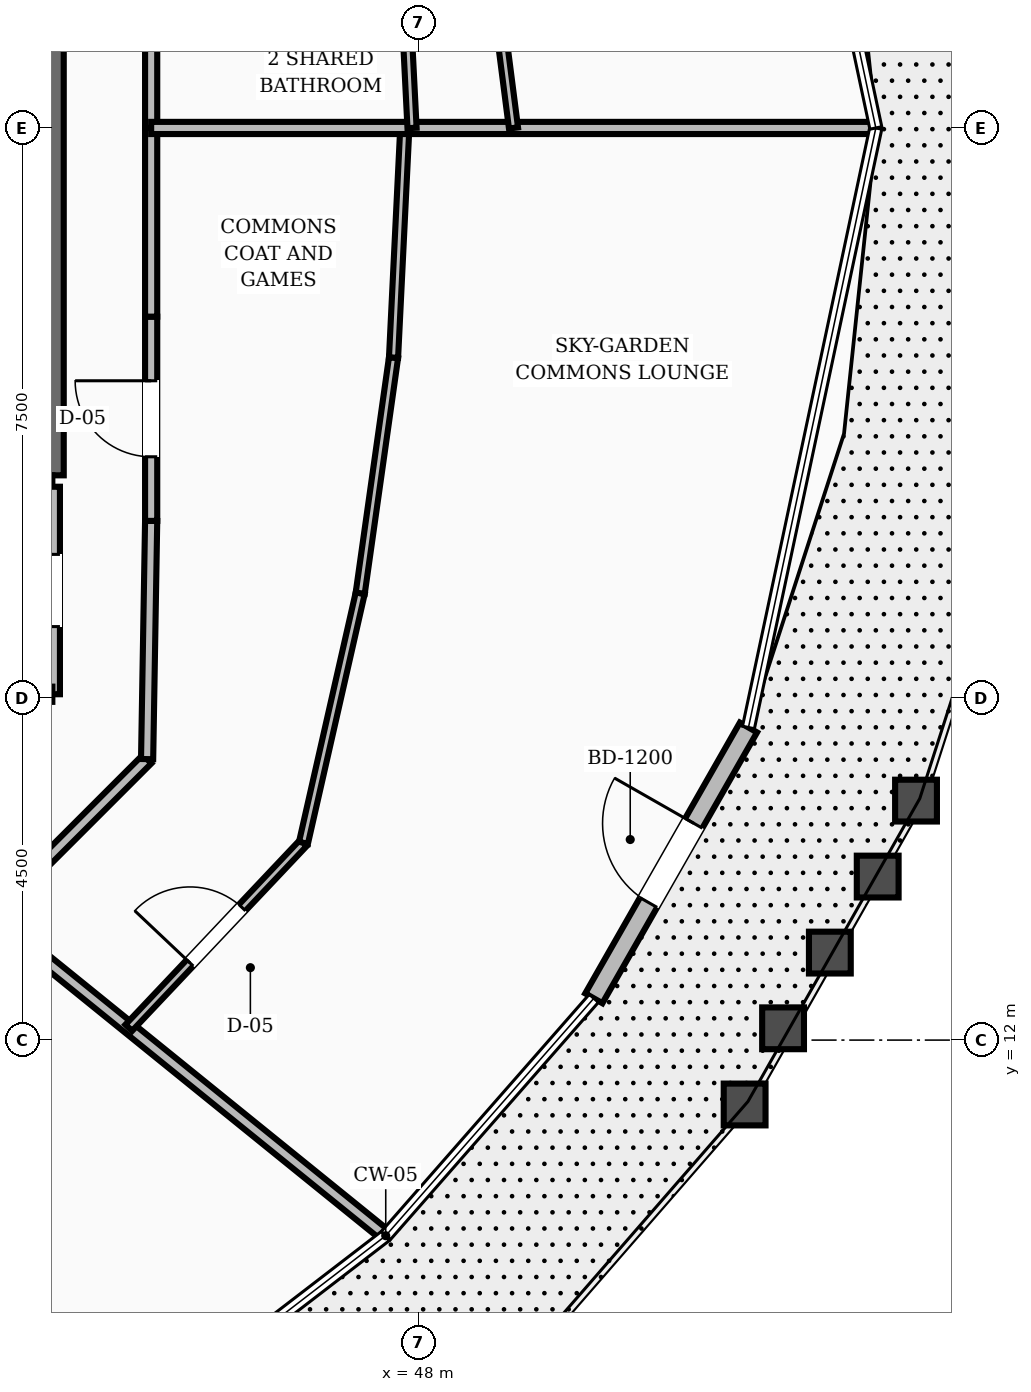
"""IFC4 building model, lengths in metres.
Left out: names, types, materials, properties, quantities, classifications, styles, units other than length and angle.
Written with IfcOpenShell. Run it as: python <this file> out.ifc"""

import sys

from ifc_helpers import new_model, si_unit, direction, frame, frame_2d, origin, place, context, subcontext, project, spatial, rectangle, extrude, element, fill, save


model = new_model("IFC4")
c1 = context("Model", 3, precision=1e-05, world=origin(), true_north=direction((0.0, 1.0)))
c2 = subcontext(c1, "Body", "Model", "MODEL_VIEW")
j1 = project(units=[si_unit("LENGTHUNIT", "METRE"), si_unit("PLANEANGLEUNIT", "RADIAN")], contexts=[c1])
p1 = place(None, origin())
s1 = spatial("IfcSite", under=j1, at=p1, CompositionType="ELEMENT")
p2 = place(p1, origin())
s2 = spatial("IfcBuilding", under=s1, at=p2, CompositionType="ELEMENT")
p3 = place(p2, frame((0.0, 0.0, 229.2)))
s3 = spatial("IfcBuildingStorey", under=s2, at=p3, CompositionType="ELEMENT", Elevation=229.2)
p4 = place(p3, frame((43.18, 19.43, 0.0), z_axis=(0.0, 0.0, 1.0), x_axis=(0.0, 1.0, 0.0)))
e1 = element("IfcWall", 1, at=p4, inside=s3, PredefinedType="SHEAR", context=c2, shape_type="SweptSolid", body=[
    extrude(rectangle(XDim=8.74, YDim=0.3, at=frame_2d((4.37, 0.0))), origin(), (0.0, 0.0, 1.0), 3.6),
])
p5 = place(p3, frame((50.304, 12.55, 0.0), z_axis=(0.0, 0.0, 1.0), x_axis=(0.495824921759, 0.868422504869, 0.0)))
e2 = element("IfcWall", 2, at=p5, inside=s3, PredefinedType="STANDARD", context=c2, shape_type="SweptSolid", body=[
    extrude(rectangle(XDim=4.103, YDim=0.26, at=frame_2d((2.052, 0.0))), origin(), (0.0, 0.0, 1.0), 2.88),
])
p6 = place(p5, frame((1.452, 0.0, 0.0)))
e3 = element("IfcOpeningElement", 3, at=p6, cuts=e2, PredefinedType="OPENING", context=c2, shape_type="SweptSolid", body=[
    extrude(rectangle(XDim=1.2, YDim=2.15, at=frame_2d((0.6, 1.075))), frame((0.0, 0.14, 0.0), z_axis=(0.0, -1.0, 0.0), x_axis=(1.0, 0.0, 0.0)), (0.0, 0.0, 1.0), 0.28),
])
p7 = place(p3, frame((43.18, 16.55, 0.0), z_axis=(0.0, 0.0, 1.0), x_axis=(0.0, 1.0, 0.0)))
e4 = element("IfcWall", 4, at=p7, inside=s3, PredefinedType="SOLIDWALL", context=c2, shape_type="SweptSolid", body=[
    extrude(rectangle(XDim=2.73, YDim=0.2, at=frame_2d((1.365, 0.0))), origin(), (0.0, 0.0, 1.0), 2.87),
])
p8 = place(p7, frame((0.89, 0.0, 0.0)))
e5 = element("IfcOpeningElement", 5, at=p8, cuts=e4, PredefinedType="OPENING", context=c2, shape_type="SweptSolid", body=[
    extrude(rectangle(XDim=0.95, YDim=2.1, at=frame_2d((0.475, 1.05))), frame((0.0, 0.11, 0.0), z_axis=(0.0, -1.0, 0.0), x_axis=(1.0, 0.0, 0.0)), (0.0, 0.0, 1.0), 0.22),
])
p9 = place(p3, frame((44.48, 24.0, 0.0), z_axis=(0.0, 0.0, 1.0), x_axis=(0.0, 1.0, 0.0)))
e6 = element("IfcWall", 6, at=p9, inside=s3, PredefinedType="SOLIDWALL", context=c2, shape_type="SweptSolid", body=[
    extrude(rectangle(XDim=2.482, YDim=0.16, at=frame_2d((1.241, 0.0))), origin(), (0.0, 0.0, 1.0), 2.87),
])
p10 = place(p3, frame((42.365, 13.635, 0.0), z_axis=(0.0, 0.0, 1.0), x_axis=(0.707106781187, 0.707106781187, 0.0)))
e7 = element("IfcWall", 7, at=p10, inside=s3, PredefinedType="SOLIDWALL", context=c2, shape_type="SweptSolid", body=[
    extrude(rectangle(XDim=2.916, YDim=0.16, at=frame_2d((1.458, 0.0))), origin(), (0.0, 0.0, 1.0), 2.87),
])
p11 = place(p3, frame((44.427, 15.697, 0.0), z_axis=(0.0, 0.0, 1.0), x_axis=(0.016981035134, 0.999855811828, 0.0)))
e8 = element("IfcWall", 8, at=p11, inside=s3, PredefinedType="SOLIDWALL", context=c2, shape_type="SweptSolid", body=[
    extrude(rectangle(XDim=3.134, YDim=0.16, at=frame_2d((1.567, 0.0))), origin(), (0.0, 0.0, 1.0), 2.87),
])
p12 = place(p3, frame((44.48, 18.831, 0.0), z_axis=(0.0, 0.0, 1.0), x_axis=(0.0, 1.0, 0.0)))
e9 = element("IfcWall", 9, at=p12, inside=s3, PredefinedType="SOLIDWALL", context=c2, shape_type="SweptSolid", body=[
    extrude(rectangle(XDim=2.687, YDim=0.16, at=frame_2d((1.344, 0.0))), origin(), (0.0, 0.0, 1.0), 2.87),
])
p13 = place(p12, frame((0.844, 0.0, 0.0)))
e10 = element("IfcOpeningElement", 10, at=p13, cuts=e9, PredefinedType="OPENING", context=c2, shape_type="SweptSolid", body=[
    extrude(rectangle(XDim=1.0, YDim=2.1, at=frame_2d((0.5, 1.05))), frame((0.0, 0.09, 0.0), z_axis=(0.0, -1.0, 0.0), x_axis=(1.0, 0.0, 0.0)), (0.0, 0.0, 1.0), 0.18),
])
p14 = place(p3, frame((44.48, 21.518, 0.0), z_axis=(0.0, 0.0, 1.0), x_axis=(0.0, 1.0, 0.0)))
e11 = element("IfcWall", 11, at=p14, inside=s3, PredefinedType="SOLIDWALL", context=c2, shape_type="SweptSolid", body=[
    extrude(rectangle(XDim=2.482, YDim=0.16, at=frame_2d((1.241, 0.0))), origin(), (0.0, 0.0, 1.0), 2.87),
])
p15 = place(p3, frame((42.365, 13.635, 0.0), z_axis=(0.0, 0.0, 1.0), x_axis=(0.777377556826, -0.629034286938, 0.0)))
e12 = element("IfcWall", 12, at=p15, inside=s3, PredefinedType="SOLIDWALL", context=c2, shape_type="SweptSolid", body=[
    extrude(rectangle(XDim=6.641, YDim=0.16, at=frame_2d((3.32, 0.0))), origin(), (0.0, 0.0, 1.0), 2.87),
])
p16 = place(p3, frame((44.185, 12.162, 0.0), z_axis=(0.0, 0.0, 1.0), x_axis=(0.686726331668, 0.726916051132, 0.0)))
e13 = element("IfcWall", 13, at=p16, inside=s3, PredefinedType="PARTITIONING", context=c2, shape_type="SweptSolid", body=[
    extrude(rectangle(XDim=3.347, YDim=0.12, at=frame_2d((1.674, 0.0))), origin(), (0.0, 0.0, 1.0), 2.87),
])
p17 = place(p16, frame((1.174, 0.0, 0.0)))
e14 = element("IfcOpeningElement", 14, at=p17, cuts=e13, PredefinedType="OPENING", context=c2, shape_type="SweptSolid", body=[
    extrude(rectangle(XDim=1.0, YDim=2.1, at=frame_2d((0.5, 1.05))), frame((0.0, 0.07, 0.0), z_axis=(0.0, -1.0, 0.0), x_axis=(1.0, 0.0, 0.0)), (0.0, 0.0, 1.0), 0.14),
])
p18 = place(p3, frame((46.484, 14.595, 0.0), z_axis=(0.0, 0.0, 1.0), x_axis=(0.221671233184, 0.975121461346, 0.0)))
e15 = element("IfcWall", 15, at=p18, inside=s3, PredefinedType="PARTITIONING", context=c2, shape_type="SweptSolid", body=[
    extrude(rectangle(XDim=3.368, YDim=0.12, at=frame_2d((1.684, 0.0))), origin(), (0.0, 0.0, 1.0), 2.87),
])
p19 = place(p3, frame((47.23, 17.879, 0.0), z_axis=(0.0, 0.0, 1.0), x_axis=(0.139990883937, 0.990152792459, 0.0)))
e16 = element("IfcWall", 16, at=p19, inside=s3, PredefinedType="PARTITIONING", context=c2, shape_type="SweptSolid", body=[
    extrude(rectangle(XDim=3.13, YDim=0.12, at=frame_2d((1.565, 0.0))), origin(), (0.0, 0.0, 1.0), 2.87),
])
p20 = place(p3, frame((47.669, 20.979, 0.0), z_axis=(0.0, 0.0, 1.0), x_axis=(0.048995554465, 0.998798996617, 0.0)))
e17 = element("IfcWall", 17, at=p20, inside=s3, PredefinedType="PARTITIONING", context=c2, shape_type="SweptSolid", body=[
    extrude(rectangle(XDim=3.025, YDim=0.12, at=frame_2d((1.512, 0.0))), origin(), (0.0, 0.0, 1.0), 2.87),
])
p21 = place(p3, frame((44.48, 24.0, 0.0), z_axis=(0.0, 0.0, 1.0), x_axis=(1.0, 0.0, 0.0)))
e18 = element("IfcWall", 18, at=p21, inside=s3, PredefinedType="SOLIDWALL", context=c2, shape_type="SweptSolid", body=[
    extrude(rectangle(XDim=9.484, YDim=0.16, at=frame_2d((4.742, 0.0))), origin(), (0.0, 0.0, 1.0), 2.87),
])
p22 = place(p3, frame((47.912, 24.0, 0.0), z_axis=(0.0, 0.0, 1.0), x_axis=(-0.050029736668, 0.998747728633, 0.0)))
e19 = element("IfcWall", 19, at=p22, inside=s3, PredefinedType="PARTITIONING", context=c2, shape_type="SweptSolid", body=[
    extrude(rectangle(XDim=3.04, YDim=0.12, at=frame_2d((1.52, 0.0))), origin(), (0.0, 0.0, 1.0), 2.87),
])
p23 = place(p3, frame((49.247, 24.0, 0.0), z_axis=(0.0, 0.0, 1.0), x_axis=(-0.12730280127, 0.991863900336, 0.0)))
e20 = element("IfcWall", 20, at=p23, inside=s3, PredefinedType="PARTITIONING", context=c2, shape_type="SweptSolid", body=[
    extrude(rectangle(XDim=6.582, YDim=0.12, at=frame_2d((3.291, 0.0))), origin(), (0.0, 0.0, 1.0), 2.87),
])
p24 = place(p23, frame((3.861, 0.0, 0.0)))
e21 = element("IfcOpeningElement", 21, at=p24, cuts=e20, PredefinedType="OPENING", context=c2, shape_type="SweptSolid", body=[
    extrude(rectangle(XDim=0.95, YDim=2.1, at=frame_2d((0.475, 1.05))), frame((0.0, 0.07, 0.0), z_axis=(0.0, -1.0, 0.0), x_axis=(1.0, 0.0, 0.0)), (0.0, 0.0, 1.0), 0.14),
])
p25 = place(p6, origin())
e22 = element("IfcDoor", 22, at=p25, inside=s3, OperationType="SINGLE_SWING_RIGHT", PredefinedType="DOOR", context=c2, shape_type="SweptSolid", body=[
    extrude(rectangle(XDim=1.2, YDim=2.15, at=frame_2d((0.6, 1.075))), frame((0.0, 0.025, 0.0), z_axis=(0.0, -1.0, 0.0), x_axis=(1.0, 0.0, 0.0)), (0.0, 0.0, 1.0), 0.05),
])
fill(e3, e22)
p26 = place(p8, origin())
e23 = element("IfcDoor", 23, at=p26, inside=s3, OperationType="SINGLE_SWING_RIGHT", PredefinedType="DOOR", context=c2, shape_type="SweptSolid", body=[
    extrude(rectangle(XDim=0.95, YDim=2.1, at=frame_2d((0.475, 1.05))), frame((0.0, 0.025, 0.0), z_axis=(0.0, -1.0, 0.0), x_axis=(1.0, 0.0, 0.0)), (0.0, 0.0, 1.0), 0.05),
])
fill(e5, e23)
p27 = place(p13, origin())
e24 = element("IfcDoor", 24, at=p27, inside=s3, OperationType="SINGLE_SWING_RIGHT", PredefinedType="DOOR", context=c2, shape_type="SweptSolid", body=[
    extrude(rectangle(XDim=1.0, YDim=2.1, at=frame_2d((0.5, 1.05))), frame((0.0, 0.025, 0.0), z_axis=(0.0, -1.0, 0.0), x_axis=(1.0, 0.0, 0.0)), (0.0, 0.0, 1.0), 0.05),
])
fill(e10, e24)
p28 = place(p17, origin())
e25 = element("IfcDoor", 25, at=p28, inside=s3, OperationType="SINGLE_SWING_LEFT", PredefinedType="DOOR", context=c2, shape_type="SweptSolid", body=[
    extrude(rectangle(XDim=1.0, YDim=2.1, at=frame_2d((0.5, 1.05))), frame((0.0, 0.025, 0.0), z_axis=(0.0, -1.0, 0.0), x_axis=(1.0, 0.0, 0.0)), (0.0, 0.0, 1.0), 0.05),
])
fill(e14, e25)
save(model, sys.argv[1])
